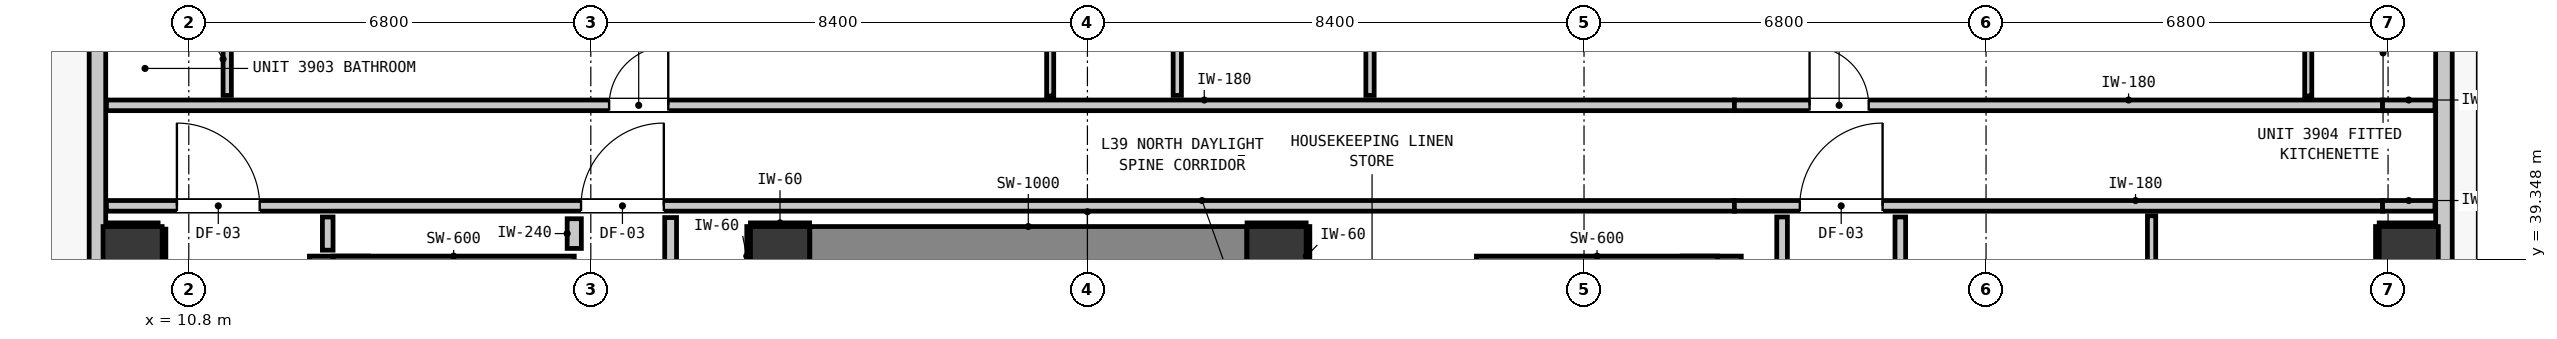
"""IFC4 building model, lengths in metres.
Left out: names, types, materials, properties, quantities, classifications, styles, units other than length and angle.
Written with IfcOpenShell. Run it as: python <this file> out.ifc"""

import sys

from ifc_helpers import new_model, si_unit, direction, frame, frame_2d, origin, origin_2d, place, context, subcontext, project, spatial, rectangle, extrude, element, fill, save


model = new_model("IFC4")
c1 = context("Model", 3, precision=1e-05, world=origin(), true_north=direction((0.0, 1.0)))
c2 = subcontext(c1, "Body", "Model", "MODEL_VIEW")
j1 = project(units=[si_unit("LENGTHUNIT", "METRE"), si_unit("PLANEANGLEUNIT", "RADIAN")], contexts=[c1])
p1 = place(None, origin())
s1 = spatial("IfcSite", under=j1, at=p1, CompositionType="ELEMENT")
p2 = place(p1, origin())
s2 = spatial("IfcBuilding", under=s1, at=p2, CompositionType="ELEMENT")
p3 = place(p2, frame((0.0, 0.0, 135.96)))
s3 = spatial("IfcBuildingStorey", under=s2, at=p3, CompositionType="ELEMENT", Elevation=135.96)
for number, where, z_axis, x_axis in (
    (1, (20.8, 39.4, 0.0), (0.0, 0.0, 1.0), (1.0, 0.0, 0.0)),
    (2, (29.2, 39.4, 0.0), (0.0, 0.0, 1.0), (1.0, 0.0, 0.0)),
):
    element("IfcColumn", number, at=place(p3, frame(where, z_axis=z_axis, x_axis=x_axis)), inside=s3, PredefinedType="COLUMN", context=c2, shape_type="SweptSolid", body=[
        extrude(rectangle(XDim=1.0, YDim=1.0, at=origin_2d()), origin(), (0.0, 0.0, 1.0), 3.32),
    ])
p4 = place(p3, frame((13.34, 31.205, 0.0), z_axis=(0.0, 0.0, 1.0), x_axis=(0.0, 1.0, 0.0)))
e3 = element("IfcWall", 3, at=p4, inside=s3, PredefinedType="SHEAR", context=c2, shape_type="SweptSolid", body=[
    extrude(rectangle(XDim=8.195, YDim=1.0, at=frame_2d((4.097, 0.0))), origin(), (0.0, 0.0, 1.0), 3.32),
])
p5 = place(p3, frame((13.24, 39.1, 0.0), z_axis=(0.0, 0.0, 1.0), x_axis=(1.0, 0.0, 0.0)))
e4 = element("IfcWall", 4, at=p5, inside=s3, PredefinedType="SHEAR", context=c2, shape_type="SweptSolid", body=[
    extrude(rectangle(XDim=4.08, YDim=0.6, at=frame_2d((2.04, 0.0))), origin(), (0.0, 0.0, 1.0), 3.32),
])
p6 = place(p3, frame((36.56, 31.205, 0.0), z_axis=(0.0, 0.0, 1.0), x_axis=(0.0, 1.0, 0.0)))
e5 = element("IfcWall", 5, at=p6, inside=s3, PredefinedType="SHEAR", context=c2, shape_type="SweptSolid", body=[
    extrude(rectangle(XDim=8.195, YDim=1.0, at=frame_2d((4.097, 0.0))), origin(), (0.0, 0.0, 1.0), 3.32),
])
p7 = place(p3, frame((32.58, 39.1, 0.0), z_axis=(0.0, 0.0, 1.0), x_axis=(1.0, 0.0, 0.0)))
e6 = element("IfcWall", 6, at=p7, inside=s3, PredefinedType="SHEAR", context=c2, shape_type="SweptSolid", body=[
    extrude(rectangle(XDim=4.08, YDim=0.6, at=frame_2d((2.04, 0.0))), origin(), (0.0, 0.0, 1.0), 3.32),
])
p8 = place(p3, frame((21.305, 39.4, 0.0), z_axis=(0.0, 0.0, 1.0), x_axis=(1.0, 0.0, 0.0)))
e7 = element("IfcWall", 7, at=p8, inside=s3, PredefinedType="SHEAR", context=c2, shape_type="SweptSolid", body=[
    extrude(rectangle(XDim=7.39, YDim=1.0, at=frame_2d((3.695, 0.0))), origin(), (0.0, 0.0, 1.0), 3.32),
])
for number, where, z_axis, x_axis in (
    (8, (9.85, 39.4, 0.0), (0.0, 0.0, 1.0), (1.0, 0.0, 0.0)),
    (9, (48.35, 39.4, 0.0), (0.0, 0.0, 1.0), (1.0, 0.0, 0.0)),
):
    element("IfcColumn", number, at=place(p3, frame(where, z_axis=z_axis, x_axis=x_axis)), inside=s3, PredefinedType="COLUMN", context=c2, shape_type="SweptSolid", body=[
        extrude(rectangle(XDim=1.0, YDim=1.0, at=origin_2d()), origin(), (0.0, 0.0, 1.0), 3.32),
    ])
p9 = place(p3, frame((9.255, 11.355, 0.0), z_axis=(0.0, 0.0, 1.0), x_axis=(0.0, 1.0, 0.0)))
e10 = element("IfcWall", 10, at=p9, inside=s3, PredefinedType="STANDARD", context=c2, shape_type="SweptSolid", body=[
    extrude(rectangle(XDim=32.29, YDim=0.28, at=frame_2d((16.145, 0.0))), origin(), (0.0, 0.0, 1.0), 3.08),
])
p10 = place(p9, frame((5.818, 0.0, 0.0)))
e11 = element("IfcOpeningElement", 11, at=p10, cuts=e10, PredefinedType="OPENING", context=c2, shape_type="SweptSolid", body=[
    extrude(rectangle(XDim=1.0, YDim=2.15, at=frame_2d((0.5, 1.075))), frame((0.0, 0.15, 0.0), z_axis=(0.0, -1.0, 0.0), x_axis=(1.0, 0.0, 0.0)), (0.0, 0.0, 1.0), 0.3),
])
p11 = place(p9, frame((0.544, 0.0, 0.85)))
e12 = element("IfcOpeningElement", 12, at=p11, cuts=e10, PredefinedType="OPENING", context=c2, shape_type="SweptSolid", body=[
    extrude(rectangle(XDim=1.05, YDim=1.65, at=frame_2d((0.525, 0.825))), frame((0.0, 0.15, 0.0), z_axis=(0.0, -1.0, 0.0), x_axis=(1.0, 0.0, 0.0)), (0.0, 0.0, 1.0), 0.3),
])
p12 = place(p3, frame((48.945, 43.645, 0.0), z_axis=(0.0, 0.0, 1.0), x_axis=(0.0, -1.0, 0.0)))
e13 = element("IfcWall", 13, at=p12, inside=s3, PredefinedType="STANDARD", context=c2, shape_type="SweptSolid", body=[
    extrude(rectangle(XDim=32.29, YDim=0.28, at=frame_2d((16.145, 0.0))), origin(), (0.0, 0.0, 1.0), 3.08),
])
p13 = place(p12, frame((5.467, 0.0, 0.0)))
e14 = element("IfcOpeningElement", 14, at=p13, cuts=e13, PredefinedType="OPENING", context=c2, shape_type="SweptSolid", body=[
    extrude(rectangle(XDim=1.0, YDim=2.15, at=frame_2d((0.5, 1.075))), frame((0.0, 0.15, 0.0), z_axis=(0.0, -1.0, 0.0), x_axis=(1.0, 0.0, 0.0)), (0.0, 0.0, 1.0), 0.3),
])
p14 = place(p12, frame((30.696, 0.0, 0.85)))
e15 = element("IfcOpeningElement", 15, at=p14, cuts=e13, PredefinedType="OPENING", context=c2, shape_type="SweptSolid", body=[
    extrude(rectangle(XDim=1.05, YDim=1.65, at=frame_2d((0.525, 0.825))), frame((0.0, 0.15, 0.0), z_axis=(0.0, -1.0, 0.0), x_axis=(1.0, 0.0, 0.0)), (0.0, 0.0, 1.0), 0.3),
])
p15 = place(p12, frame((14.461, 0.0, 0.85)))
e16 = element("IfcOpeningElement", 16, at=p15, cuts=e13, PredefinedType="OPENING", context=c2, shape_type="SweptSolid", body=[
    extrude(rectangle(XDim=2.4, YDim=1.95, at=frame_2d((1.2, 0.975))), frame((0.0, 0.15, 0.0), z_axis=(0.0, -1.0, 0.0), x_axis=(1.0, 0.0, 0.0)), (0.0, 0.0, 1.0), 0.3),
])
p16 = place(p12, frame((7.106, 0.0, 0.85)))
e17 = element("IfcOpeningElement", 17, at=p16, cuts=e13, PredefinedType="OPENING", context=c2, shape_type="SweptSolid", body=[
    extrude(rectangle(XDim=1.05, YDim=1.65, at=frame_2d((0.525, 0.825))), frame((0.0, 0.15, 0.0), z_axis=(0.0, -1.0, 0.0), x_axis=(1.0, 0.0, 0.0)), (0.0, 0.0, 1.0), 0.3),
])
p17 = place(p3, frame((9.407, 40.25, 0.0), z_axis=(0.0, 0.0, 1.0), x_axis=(1.0, 0.0, 0.0)))
e18 = element("IfcWall", 18, at=p17, inside=s3, PredefinedType="PARTITIONING", context=c2, shape_type="SweptSolid", body=[
    extrude(rectangle(XDim=27.536, YDim=0.18, at=frame_2d((13.768, 0.0))), origin(), (0.0, 0.0, 1.0), 3.08),
])
p18 = place(p17, frame((8.028, 0.0, 0.0)))
e19 = element("IfcOpeningElement", 19, at=p18, cuts=e18, PredefinedType="OPENING", context=c2, shape_type="SweptSolid", body=[
    extrude(rectangle(XDim=1.4, YDim=2.15, at=frame_2d((0.7, 1.075))), frame((0.0, 0.1, 0.0), z_axis=(0.0, -1.0, 0.0), x_axis=(1.0, 0.0, 0.0)), (0.0, 0.0, 1.0), 0.2),
])
p19 = place(p17, frame((1.192, 0.0, 0.0)))
e20 = element("IfcOpeningElement", 20, at=p19, cuts=e18, PredefinedType="OPENING", context=c2, shape_type="SweptSolid", body=[
    extrude(rectangle(XDim=1.4, YDim=2.15, at=frame_2d((0.7, 1.075))), frame((0.0, 0.1, 0.0), z_axis=(0.0, -1.0, 0.0), x_axis=(1.0, 0.0, 0.0)), (0.0, 0.0, 1.0), 0.2),
])
p20 = place(p3, frame((36.943, 40.25, 0.0), z_axis=(0.0, 0.0, 1.0), x_axis=(1.0, 0.0, 0.0)))
e21 = element("IfcWall", 21, at=p20, inside=s3, PredefinedType="PARTITIONING", context=c2, shape_type="SweptSolid", body=[
    extrude(rectangle(XDim=10.964, YDim=0.18, at=frame_2d((5.482, 0.0))), origin(), (0.0, 0.0, 1.0), 2.565),
])
p21 = place(p20, frame((1.107, 0.0, 0.0)))
e22 = element("IfcOpeningElement", 22, at=p21, cuts=e21, PredefinedType="OPENING", context=c2, shape_type="SweptSolid", body=[
    extrude(rectangle(XDim=1.4, YDim=2.15, at=frame_2d((0.7, 1.075))), frame((0.0, 0.1, 0.0), z_axis=(0.0, -1.0, 0.0), x_axis=(1.0, 0.0, 0.0)), (0.0, 0.0, 1.0), 0.2),
])
p22 = place(p3, frame((47.907, 40.25, 0.0), z_axis=(0.0, 0.0, 1.0), x_axis=(1.0, 0.0, 0.0)))
e23 = element("IfcWall", 23, at=p22, inside=s3, PredefinedType="PARTITIONING", context=c2, shape_type="SweptSolid", body=[
    extrude(rectangle(XDim=0.886, YDim=0.18, at=frame_2d((0.443, 0.0))), origin(), (0.0, 0.0, 1.0), 3.08),
])
p23 = place(p3, frame((9.407, 41.95, 0.0), z_axis=(0.0, 0.0, 1.0), x_axis=(1.0, 0.0, 0.0)))
e24 = element("IfcWall", 24, at=p23, inside=s3, PredefinedType="PARTITIONING", context=c2, shape_type="SweptSolid", body=[
    extrude(rectangle(XDim=27.536, YDim=0.18, at=frame_2d((13.768, 0.0))), origin(), (0.0, 0.0, 1.0), 3.08),
])
p24 = place(p23, frame((8.503, 0.0, 0.0)))
e25 = element("IfcOpeningElement", 25, at=p24, cuts=e24, PredefinedType="OPENING", context=c2, shape_type="SweptSolid", body=[
    extrude(rectangle(XDim=1.0, YDim=2.15, at=frame_2d((0.5, 1.075))), frame((0.0, 0.1, 0.0), z_axis=(0.0, -1.0, 0.0), x_axis=(1.0, 0.0, 0.0)), (0.0, 0.0, 1.0), 0.2),
])
p25 = place(p3, frame((36.943, 41.95, 0.0), z_axis=(0.0, 0.0, 1.0), x_axis=(1.0, 0.0, 0.0)))
e26 = element("IfcWall", 26, at=p25, inside=s3, PredefinedType="PARTITIONING", context=c2, shape_type="SweptSolid", body=[
    extrude(rectangle(XDim=10.964, YDim=0.18, at=frame_2d((5.482, 0.0))), origin(), (0.0, 0.0, 1.0), 2.565),
])
p26 = place(p25, frame((1.272, 0.0, 0.0)))
e27 = element("IfcOpeningElement", 27, at=p26, cuts=e26, PredefinedType="OPENING", context=c2, shape_type="SweptSolid", body=[
    extrude(rectangle(XDim=1.0, YDim=2.15, at=frame_2d((0.5, 1.075))), frame((0.0, 0.1, 0.0), z_axis=(0.0, -1.0, 0.0), x_axis=(1.0, 0.0, 0.0)), (0.0, 0.0, 1.0), 0.2),
])
p27 = place(p3, frame((47.907, 41.95, 0.0), z_axis=(0.0, 0.0, 1.0), x_axis=(1.0, 0.0, 0.0)))
e28 = element("IfcWall", 28, at=p27, inside=s3, PredefinedType="PARTITIONING", context=c2, shape_type="SweptSolid", body=[
    extrude(rectangle(XDim=0.886, YDim=0.18, at=frame_2d((0.443, 0.0))), origin(), (0.0, 0.0, 1.0), 3.08),
])
p28 = place(p3, frame((17.32, 39.53, 0.0), z_axis=(0.0, 0.0, 1.0), x_axis=(0.0, 1.0, 0.0)))
e29 = element("IfcWall", 29, at=p28, inside=s3, PredefinedType="PARTITIONING", context=c2, shape_type="SweptSolid", body=[
    extrude(rectangle(XDim=0.502, YDim=0.24, at=frame_2d((0.251, 0.0))), origin(), (0.0, 0.0, 1.0), 3.08),
])
p29 = place(p3, frame((18.95, 38.918, 0.0), z_axis=(0.0, 0.0, 1.0), x_axis=(0.0, 1.0, 0.0)))
e30 = element("IfcWall", 30, at=p29, inside=s3, PredefinedType="PARTITIONING", context=c2, shape_type="SweptSolid", body=[
    extrude(rectangle(XDim=1.134, YDim=0.2, at=frame_2d((0.567, 0.0))), origin(), (0.0, 0.0, 1.0), 3.08),
])
p30 = place(p3, frame((13.15, 39.5, 0.0), z_axis=(0.0, 0.0, 1.0), x_axis=(0.0, 1.0, 0.0)))
e31 = element("IfcWall", 31, at=p30, inside=s3, PredefinedType="PARTITIONING", context=c2, shape_type="SweptSolid", body=[
    extrude(rectangle(XDim=0.562, YDim=0.18, at=frame_2d((0.281, 0.0))), origin(), (0.0, 0.0, 1.0), 2.315),
])
p31 = place(p3, frame((37.75, 21.368, 0.0), z_axis=(0.0, 0.0, 1.0), x_axis=(0.0, 1.0, 0.0)))
e32 = element("IfcWall", 32, at=p31, inside=s3, PredefinedType="PARTITIONING", context=c2, shape_type="SweptSolid", body=[
    extrude(rectangle(XDim=18.694, YDim=0.18, at=frame_2d((9.347, 0.0))), origin(), (0.0, 0.0, 1.0), 3.08),
])
p32 = place(p3, frame((39.75, 35.118, 0.0), z_axis=(0.0, 0.0, 1.0), x_axis=(0.0, 1.0, 0.0)))
e33 = element("IfcWall", 33, at=p32, inside=s3, PredefinedType="PARTITIONING", context=c2, shape_type="SweptSolid", body=[
    extrude(rectangle(XDim=4.944, YDim=0.18, at=frame_2d((2.472, 0.0))), origin(), (0.0, 0.0, 1.0), 3.08),
])
p33 = place(p3, frame((11.45, 42.118, 0.0), z_axis=(0.0, 0.0, 1.0), x_axis=(0.0, 1.0, 0.0)))
e34 = element("IfcWall", 34, at=p33, inside=s3, PredefinedType="PARTITIONING", context=c2, shape_type="SweptSolid", body=[
    extrude(rectangle(XDim=2.808, YDim=0.14, at=frame_2d((1.404, 0.0))), origin(), (0.0, 0.0, 1.0), 2.565),
])
p34 = place(p33, frame((1.327, 0.0, 0.0)))
e35 = element("IfcOpeningElement", 35, at=p34, cuts=e34, PredefinedType="OPENING", context=c2, shape_type="SweptSolid", body=[
    extrude(rectangle(XDim=0.86, YDim=2.02, at=frame_2d((0.43, 1.01))), frame((0.0, 0.08, 0.0), z_axis=(0.0, -1.0, 0.0), x_axis=(1.0, 0.0, 0.0)), (0.0, 0.0, 1.0), 0.16),
])
p35 = place(p3, frame((27.52, 42.118, 0.0), z_axis=(0.0, 0.0, 1.0), x_axis=(0.0, 1.0, 0.0)))
e36 = element("IfcWall", 36, at=p35, inside=s3, PredefinedType="PARTITIONING", context=c2, shape_type="SweptSolid", body=[
    extrude(rectangle(XDim=3.675, YDim=0.14, at=frame_2d((1.837, 0.0))), origin(), (0.0, 0.0, 1.0), 3.08),
])
p36 = place(p3, frame((30.78, 42.118, 0.0), z_axis=(0.0, 0.0, 1.0), x_axis=(0.0, 1.0, 0.0)))
e37 = element("IfcWall", 37, at=p36, inside=s3, PredefinedType="PARTITIONING", context=c2, shape_type="SweptSolid", body=[
    extrude(rectangle(XDim=3.675, YDim=0.14, at=frame_2d((1.837, 0.0))), origin(), (0.0, 0.0, 1.0), 3.08),
])
p37 = place(p36, frame((1.327, 0.0, 0.0)))
e38 = element("IfcOpeningElement", 38, at=p37, cuts=e37, PredefinedType="OPENING", context=c2, shape_type="SweptSolid", body=[
    extrude(rectangle(XDim=0.86, YDim=2.02, at=frame_2d((0.43, 1.01))), frame((0.0, 0.08, 0.0), z_axis=(0.0, -1.0, 0.0), x_axis=(1.0, 0.0, 0.0)), (0.0, 0.0, 1.0), 0.16),
])
p38 = place(p3, frame((44.0, 35.098, 0.0), z_axis=(0.0, 0.0, 1.0), x_axis=(0.0, 1.0, 0.0)))
e39 = element("IfcWall", 39, at=p38, inside=s3, PredefinedType="PARTITIONING", context=c2, shape_type="SweptSolid", body=[
    extrude(rectangle(XDim=4.984, YDim=0.14, at=frame_2d((2.492, 0.0))), origin(), (0.0, 0.0, 1.0), 3.08),
])
p39 = place(p3, frame((25.37, 42.108, 0.0), z_axis=(0.0, 0.0, 1.0), x_axis=(0.0, 1.0, 0.0)))
e40 = element("IfcWall", 40, at=p39, inside=s3, PredefinedType="PARTITIONING", context=c2, shape_type="SweptSolid", body=[
    extrude(rectangle(XDim=3.685, YDim=0.12, at=frame_2d((1.843, 0.0))), origin(), (0.0, 0.0, 1.0), 3.08),
])
p40 = place(p39, frame((1.317, 0.0, 0.0)))
e41 = element("IfcOpeningElement", 41, at=p40, cuts=e40, PredefinedType="OPENING", context=c2, shape_type="SweptSolid", body=[
    extrude(rectangle(XDim=0.9, YDim=2.1, at=frame_2d((0.45, 1.05))), frame((0.0, 0.07, 0.0), z_axis=(0.0, -1.0, 0.0), x_axis=(1.0, 0.0, 0.0)), (0.0, 0.0, 1.0), 0.14),
])
p41 = place(p3, frame((46.65, 42.108, 0.0), z_axis=(0.0, 0.0, 1.0), x_axis=(0.0, 1.0, 0.0)))
e42 = element("IfcWall", 42, at=p41, inside=s3, PredefinedType="PARTITIONING", context=c2, shape_type="SweptSolid", body=[
    extrude(rectangle(XDim=3.617, YDim=0.12, at=frame_2d((1.809, 0.0))), origin(), (0.0, 0.0, 1.0), 3.08),
])
p42 = place(p41, frame((1.317, 0.0, 0.0)))
e43 = element("IfcOpeningElement", 43, at=p42, cuts=e42, PredefinedType="OPENING", context=c2, shape_type="SweptSolid", body=[
    extrude(rectangle(XDim=0.9, YDim=2.1, at=frame_2d((0.45, 1.05))), frame((0.0, 0.07, 0.0), z_axis=(0.0, -1.0, 0.0), x_axis=(1.0, 0.0, 0.0)), (0.0, 0.0, 1.0), 0.14),
])
for number, where, z_axis, x_axis in (
    (44, (20.3, 39.932, 0.0), (0.0, 0.0, 1.0), (1.0, 0.0, 0.0)),
    (45, (20.268, 38.9, 0.0), (0.0, 0.0, 1.0), (0.0, 1.0, 0.0)),
    (46, (28.7, 39.932, 0.0), (0.0, 0.0, 1.0), (1.0, 0.0, 0.0)),
    (47, (29.732, 38.9, 0.0), (0.0, 0.0, 1.0), (0.0, 1.0, 0.0)),
):
    element("IfcWall", number, at=place(p3, frame(where, z_axis=z_axis, x_axis=x_axis)), inside=s3, PredefinedType="PARTITIONING", context=c2, shape_type="SweptSolid", body=[
        extrude(rectangle(XDim=1.0, YDim=0.06, at=frame_2d((0.5, 0.0))), origin(), (0.0, 0.0, 1.0), 1.45),
    ])
p43 = place(p3, frame((9.41, 39.932, 0.0), z_axis=(0.0, 0.0, 1.0), x_axis=(1.0, 0.0, 0.0)))
e48 = element("IfcWall", 48, at=p43, inside=s3, PredefinedType="PARTITIONING", context=c2, shape_type="SweptSolid", body=[
    extrude(rectangle(XDim=0.871, YDim=0.06, at=frame_2d((0.436, 0.0))), origin(), (0.0, 0.0, 1.0), 1.45),
])
p44 = place(p3, frame((10.382, 38.9, 0.0), z_axis=(0.0, 0.0, 1.0), x_axis=(0.0, 1.0, 0.0)))
e49 = element("IfcWall", 49, at=p44, inside=s3, PredefinedType="PARTITIONING", context=c2, shape_type="SweptSolid", body=[
    extrude(rectangle(XDim=0.956, YDim=0.06, at=frame_2d((0.478, 0.0))), origin(), (0.0, 0.0, 1.0), 1.45),
])
p45 = place(p3, frame((47.85, 39.932, 0.0), z_axis=(0.0, 0.0, 1.0), x_axis=(1.0, 0.0, 0.0)))
e50 = element("IfcWall", 50, at=p45, inside=s3, PredefinedType="PARTITIONING", context=c2, shape_type="SweptSolid", body=[
    extrude(rectangle(XDim=0.94, YDim=0.06, at=frame_2d((0.47, 0.0))), origin(), (0.0, 0.0, 1.0), 1.45),
])
p46 = place(p3, frame((47.818, 38.9, 0.0), z_axis=(0.0, 0.0, 1.0), x_axis=(0.0, 1.0, 0.0)))
e51 = element("IfcWall", 51, at=p46, inside=s3, PredefinedType="PARTITIONING", context=c2, shape_type="SweptSolid", body=[
    extrude(rectangle(XDim=1.0, YDim=0.06, at=frame_2d((0.5, 0.0))), origin(), (0.0, 0.0, 1.0), 1.45),
])
p47 = place(p18, origin())
e52 = element("IfcDoor", 52, at=p47, inside=s3, OperationType="SINGLE_SWING_RIGHT", PredefinedType="DOOR", context=c2, shape_type="SweptSolid", body=[
    extrude(rectangle(XDim=1.4, YDim=2.15, at=frame_2d((0.7, 1.075))), frame((0.0, 0.025, 0.0), z_axis=(0.0, -1.0, 0.0), x_axis=(1.0, 0.0, 0.0)), (0.0, 0.0, 1.0), 0.05),
])
fill(e19, e52)
p48 = place(p19, origin())
e53 = element("IfcDoor", 53, at=p48, inside=s3, OperationType="SINGLE_SWING_LEFT", PredefinedType="DOOR", context=c2, shape_type="SweptSolid", body=[
    extrude(rectangle(XDim=1.4, YDim=2.15, at=frame_2d((0.7, 1.075))), frame((0.0, 0.025, 0.0), z_axis=(0.0, -1.0, 0.0), x_axis=(1.0, 0.0, 0.0)), (0.0, 0.0, 1.0), 0.05),
])
fill(e20, e53)
p49 = place(p21, origin())
e54 = element("IfcDoor", 54, at=p49, inside=s3, OperationType="SINGLE_SWING_RIGHT", PredefinedType="DOOR", context=c2, shape_type="SweptSolid", body=[
    extrude(rectangle(XDim=1.4, YDim=2.15, at=frame_2d((0.7, 1.075))), frame((0.0, 0.025, 0.0), z_axis=(0.0, -1.0, 0.0), x_axis=(1.0, 0.0, 0.0)), (0.0, 0.0, 1.0), 0.05),
])
fill(e22, e54)
p50 = place(p24, origin())
e55 = element("IfcDoor", 55, at=p50, inside=s3, OperationType="SINGLE_SWING_RIGHT", PredefinedType="DOOR", context=c2, shape_type="SweptSolid", body=[
    extrude(rectangle(XDim=1.0, YDim=2.15, at=frame_2d((0.5, 1.075))), frame((0.0, 0.025, 0.0), z_axis=(0.0, -1.0, 0.0), x_axis=(1.0, 0.0, 0.0)), (0.0, 0.0, 1.0), 0.05),
])
fill(e25, e55)
p51 = place(p26, origin())
e56 = element("IfcDoor", 56, at=p51, inside=s3, OperationType="SINGLE_SWING_LEFT", PredefinedType="DOOR", context=c2, shape_type="SweptSolid", body=[
    extrude(rectangle(XDim=1.0, YDim=2.15, at=frame_2d((0.5, 1.075))), frame((0.0, 0.025, 0.0), z_axis=(0.0, -1.0, 0.0), x_axis=(1.0, 0.0, 0.0)), (0.0, 0.0, 1.0), 0.05),
])
fill(e27, e56)
save(model, sys.argv[1])
